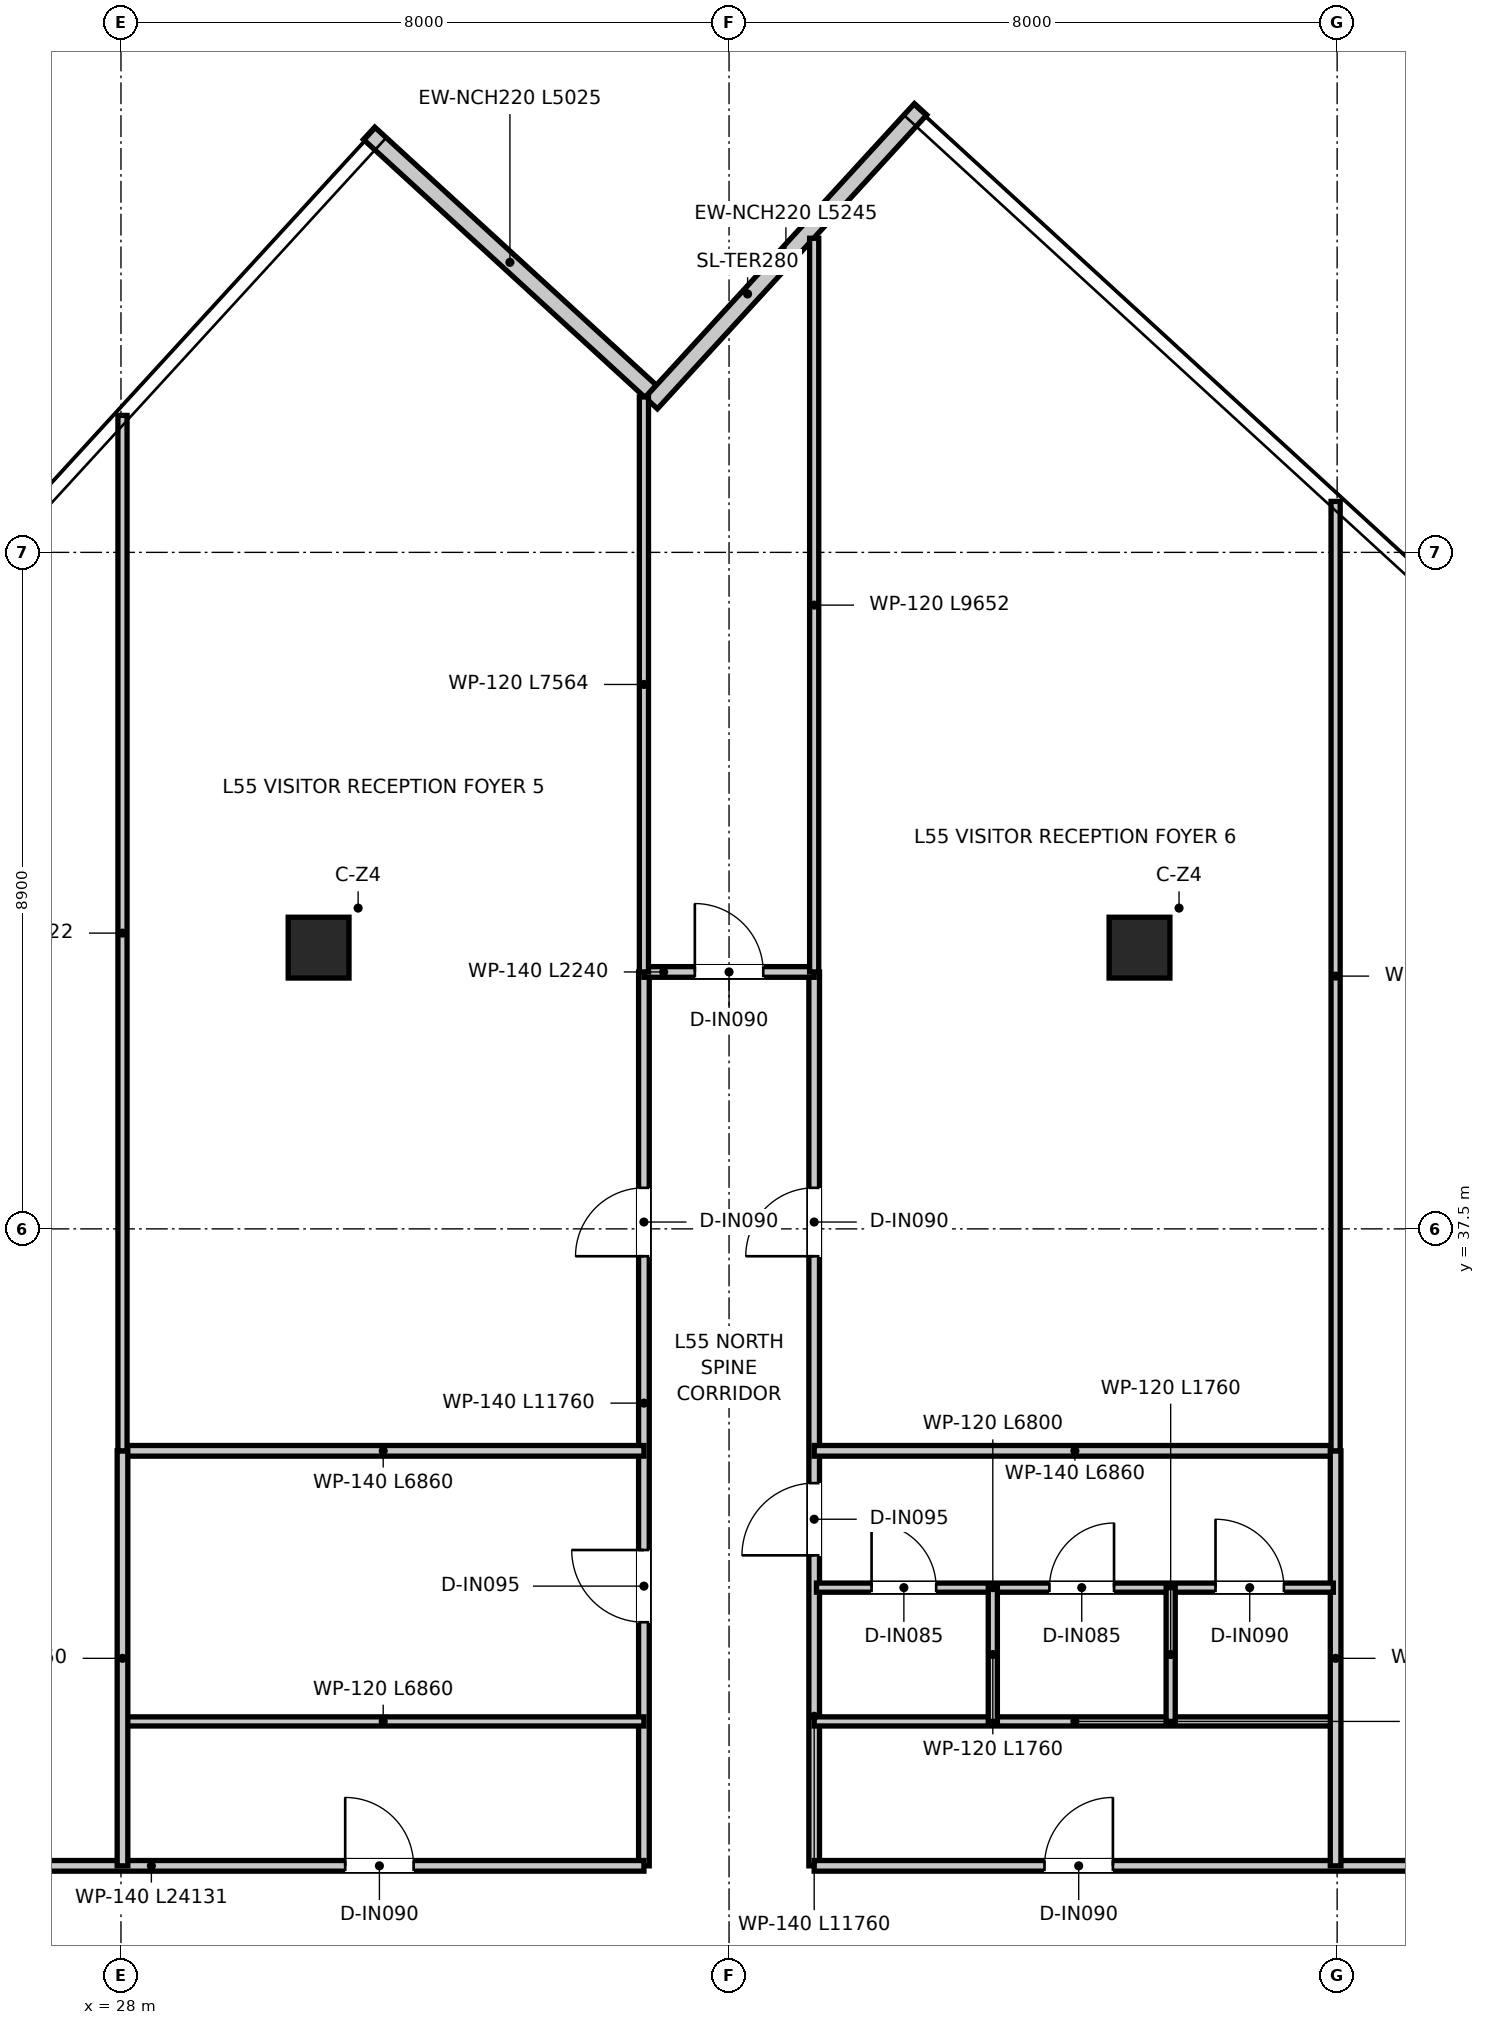
"""IFC4 building model, lengths in metres.
Left out: names, types, materials, properties, quantities, classifications, styles, units other than length and angle.
Written with IfcOpenShell. Run it as: python <this file> out.ifc"""

import sys

from ifc_helpers import new_model, si_unit, direction, frame, frame_2d, origin, origin_2d, place, context, subcontext, project, spatial, rectangle, extrude, source, transform, mapped, element, fill, save


model = new_model("IFC4")
c1 = context("Model", 3, precision=1e-05, world=origin(), true_north=direction((0.0, 1.0)))
c2 = subcontext(c1, "Body", "Model", "MODEL_VIEW")
j1 = project(units=[si_unit("LENGTHUNIT", "METRE"), si_unit("PLANEANGLEUNIT", "RADIAN")], contexts=[c1])
p1 = place(None, origin())
s1 = spatial("IfcSite", under=j1, at=p1, CompositionType="ELEMENT")
p2 = place(p1, origin())
s2 = spatial("IfcBuilding", under=s1, at=p2, CompositionType="ELEMENT")
p3 = place(p2, frame((0.0, 0.0, 227.05)))
s3 = spatial("IfcBuildingStorey", under=s2, at=p3, CompositionType="ELEMENT", Elevation=227.05)
m1 = source(origin(), c2, "Body", "SweptSolid", [
    extrude(rectangle(XDim=0.8, YDim=0.8, at=origin_2d()), origin(), (0.0, 0.0, 1.0), 3.95),
])
for number, where, z_axis, x_axis in (
    (1, (30.6, 41.2, 0.0), (0.0, 0.0, 1.0), (1.0, 0.0, 0.0)),
    (2, (41.4, 41.2, 0.0), (0.0, 0.0, 1.0), (1.0, 0.0, 0.0)),
):
    element("IfcColumn", number, at=place(p3, frame(where, z_axis=z_axis, x_axis=x_axis)), inside=s3, PredefinedType="COLUMN", context=c2, shape_type="MappedRepresentation", body=[
        mapped(m1, transform((0.0, 0.0, 0.0), x_axis=(1.0, 0.0, 0.0), y_axis=(0.0, 1.0, 0.0), z_axis=(0.0, 0.0, 1.0), scale=1.0)),
    ])
p4 = place(p3, frame((34.969, 48.518, 0.0), z_axis=(0.0, 0.0, 1.0), x_axis=(-0.737285215553, 0.675581609375, 0.0)))
e3 = element("IfcWall", 3, at=p4, inside=s3, PredefinedType="ELEMENTEDWALL", context=c2, shape_type="SweptSolid", body=[
    extrude(rectangle(XDim=5.025, YDim=0.22, at=frame_2d((2.512, 0.0))), origin(), (0.0, 0.0, 1.0), 3.67),
])
p5 = place(p3, frame((38.52, 52.23, 0.0), z_axis=(0.0, 0.0, 1.0), x_axis=(-0.675596040677, -0.737271991752, 0.0)))
e4 = element("IfcWall", 4, at=p5, inside=s3, PredefinedType="ELEMENTEDWALL", context=c2, shape_type="SweptSolid", body=[
    extrude(rectangle(XDim=5.245, YDim=0.22, at=frame_2d((2.623, 0.0))), origin(), (0.0, 0.0, 1.0), 3.67),
])
p6 = place(p3, frame((34.88, 29.12, 0.0), z_axis=(0.0, 0.0, 1.0), x_axis=(0.0, 1.0, 0.0)))
e5 = element("IfcWall", 5, at=p6, inside=s3, PredefinedType="PARTITIONING", context=c2, shape_type="SweptSolid", body=[
    extrude(rectangle(XDim=11.76, YDim=0.14, at=frame_2d((5.88, 0.0))), origin(), (0.0, 0.0, 1.0), 3.03),
])
p7 = place(p6, frame((3.205, 0.0, 0.0)))
e6 = element("IfcOpeningElement", 6, at=p7, cuts=e5, PredefinedType="OPENING", context=c2, shape_type="SweptSolid", body=[
    extrude(rectangle(XDim=0.95, YDim=2.1, at=frame_2d((0.475, 1.05))), frame((0.0, 0.08, 0.0), z_axis=(0.0, -1.0, 0.0), x_axis=(1.0, 0.0, 0.0)), (0.0, 0.0, 1.0), 0.16),
])
p8 = place(p6, frame((8.02, 0.0, 0.0)))
e7 = element("IfcOpeningElement", 7, at=p8, cuts=e5, PredefinedType="OPENING", context=c2, shape_type="SweptSolid", body=[
    extrude(rectangle(XDim=0.9, YDim=2.1, at=frame_2d((0.45, 1.05))), frame((0.0, 0.08, 0.0), z_axis=(0.0, -1.0, 0.0), x_axis=(1.0, 0.0, 0.0)), (0.0, 0.0, 1.0), 0.16),
])
p9 = place(p3, frame((37.12, 29.12, 0.0), z_axis=(0.0, 0.0, 1.0), x_axis=(0.0, 1.0, 0.0)))
e8 = element("IfcWall", 8, at=p9, inside=s3, PredefinedType="PARTITIONING", context=c2, shape_type="SweptSolid", body=[
    extrude(rectangle(XDim=11.76, YDim=0.14, at=frame_2d((5.88, 0.0))), origin(), (0.0, 0.0, 1.0), 3.03),
])
p10 = place(p9, frame((4.085, 0.0, 0.0)))
e9 = element("IfcOpeningElement", 9, at=p10, cuts=e8, PredefinedType="OPENING", context=c2, shape_type="SweptSolid", body=[
    extrude(rectangle(XDim=0.95, YDim=2.1, at=frame_2d((0.475, 1.05))), frame((0.0, 0.08, 0.0), z_axis=(0.0, -1.0, 0.0), x_axis=(1.0, 0.0, 0.0)), (0.0, 0.0, 1.0), 0.16),
])
p11 = place(p9, frame((8.02, 0.0, 0.0)))
e10 = element("IfcOpeningElement", 10, at=p11, cuts=e8, PredefinedType="OPENING", context=c2, shape_type="SweptSolid", body=[
    extrude(rectangle(XDim=0.9, YDim=2.1, at=frame_2d((0.45, 1.05))), frame((0.0, 0.08, 0.0), z_axis=(0.0, -1.0, 0.0), x_axis=(1.0, 0.0, 0.0)), (0.0, 0.0, 1.0), 0.16),
])
p12 = place(p3, frame((34.88, 40.88, 0.0), z_axis=(0.0, 0.0, 1.0), x_axis=(1.0, 0.0, 0.0)))
e11 = element("IfcWall", 11, at=p12, inside=s3, PredefinedType="PARTITIONING", context=c2, shape_type="SweptSolid", body=[
    extrude(rectangle(XDim=2.24, YDim=0.14, at=frame_2d((1.12, 0.0))), origin(), (0.0, 0.0, 1.0), 3.67),
])
p13 = place(p12, frame((0.67, 0.0, 0.0)))
e12 = element("IfcOpeningElement", 12, at=p13, cuts=e11, PredefinedType="OPENING", context=c2, shape_type="SweptSolid", body=[
    extrude(rectangle(XDim=0.9, YDim=2.1, at=frame_2d((0.45, 1.05))), frame((0.0, 0.08, 0.0), z_axis=(0.0, -1.0, 0.0), x_axis=(1.0, 0.0, 0.0)), (0.0, 0.0, 1.0), 0.16),
])
p14 = place(p3, frame((10.749, 29.12, 0.0), z_axis=(0.0, 0.0, 1.0), x_axis=(1.0, 0.0, 0.0)))
e13 = element("IfcWall", 13, at=p14, inside=s3, PredefinedType="PARTITIONING", context=c2, shape_type="SweptSolid", body=[
    extrude(rectangle(XDim=24.131, YDim=0.14, at=frame_2d((12.065, 0.0))), origin(), (0.0, 0.0, 1.0), 3.03),
])
p15 = place(p14, frame((20.201, 0.0, 0.0)))
e14 = element("IfcOpeningElement", 14, at=p15, cuts=e13, PredefinedType="OPENING", context=c2, shape_type="SweptSolid", body=[
    extrude(rectangle(XDim=0.9, YDim=2.1, at=frame_2d((0.45, 1.05))), frame((0.0, 0.08, 0.0), z_axis=(0.0, -1.0, 0.0), x_axis=(1.0, 0.0, 0.0)), (0.0, 0.0, 1.0), 0.16),
])
p16 = place(p14, frame((4.664, 0.0, 0.0)))
e15 = element("IfcOpeningElement", 15, at=p16, cuts=e13, PredefinedType="OPENING", context=c2, shape_type="SweptSolid", body=[
    extrude(rectangle(XDim=0.9, YDim=2.1, at=frame_2d((0.45, 1.05))), frame((0.0, 0.08, 0.0), z_axis=(0.0, -1.0, 0.0), x_axis=(1.0, 0.0, 0.0)), (0.0, 0.0, 1.0), 0.16),
])
p17 = place(p14, frame((10.501, 0.0, 0.0)))
e16 = element("IfcOpeningElement", 16, at=p17, cuts=e13, PredefinedType="OPENING", context=c2, shape_type="SweptSolid", body=[
    extrude(rectangle(XDim=0.9, YDim=2.1, at=frame_2d((0.45, 1.05))), frame((0.0, 0.08, 0.0), z_axis=(0.0, -1.0, 0.0), x_axis=(1.0, 0.0, 0.0)), (0.0, 0.0, 1.0), 0.16),
])
p18 = place(p14, frame((14.201, 0.0, 0.0)))
e17 = element("IfcOpeningElement", 17, at=p18, cuts=e13, PredefinedType="OPENING", context=c2, shape_type="SweptSolid", body=[
    extrude(rectangle(XDim=0.9, YDim=2.1, at=frame_2d((0.45, 1.05))), frame((0.0, 0.08, 0.0), z_axis=(0.0, -1.0, 0.0), x_axis=(1.0, 0.0, 0.0)), (0.0, 0.0, 1.0), 0.16),
])
p19 = place(p3, frame((37.12, 29.12, 0.0), z_axis=(0.0, 0.0, 1.0), x_axis=(1.0, 0.0, 0.0)))
e18 = element("IfcWall", 18, at=p19, inside=s3, PredefinedType="PARTITIONING", context=c2, shape_type="SweptSolid", body=[
    extrude(rectangle(XDim=21.815, YDim=0.14, at=frame_2d((10.908, 0.0))), origin(), (0.0, 0.0, 1.0), 3.03),
])
p20 = place(p19, frame((3.03, 0.0, 0.0)))
e19 = element("IfcOpeningElement", 19, at=p20, cuts=e18, PredefinedType="OPENING", context=c2, shape_type="SweptSolid", body=[
    extrude(rectangle(XDim=0.9, YDim=2.1, at=frame_2d((0.45, 1.05))), frame((0.0, 0.08, 0.0), z_axis=(0.0, -1.0, 0.0), x_axis=(1.0, 0.0, 0.0)), (0.0, 0.0, 1.0), 0.16),
])
p21 = place(p19, frame((8.52, 0.0, 0.0)))
e20 = element("IfcOpeningElement", 20, at=p21, cuts=e18, PredefinedType="OPENING", context=c2, shape_type="SweptSolid", body=[
    extrude(rectangle(XDim=0.9, YDim=2.1, at=frame_2d((0.45, 1.05))), frame((0.0, 0.08, 0.0), z_axis=(0.0, -1.0, 0.0), x_axis=(1.0, 0.0, 0.0)), (0.0, 0.0, 1.0), 0.16),
])
p22 = place(p19, frame((12.23, 0.0, 0.0)))
e21 = element("IfcOpeningElement", 21, at=p22, cuts=e18, PredefinedType="OPENING", context=c2, shape_type="SweptSolid", body=[
    extrude(rectangle(XDim=0.9, YDim=2.1, at=frame_2d((0.45, 1.05))), frame((0.0, 0.08, 0.0), z_axis=(0.0, -1.0, 0.0), x_axis=(1.0, 0.0, 0.0)), (0.0, 0.0, 1.0), 0.16),
])
p23 = place(p19, frame((18.367, 0.0, 0.0)))
e22 = element("IfcOpeningElement", 22, at=p23, cuts=e18, PredefinedType="OPENING", context=c2, shape_type="SweptSolid", body=[
    extrude(rectangle(XDim=0.9, YDim=2.1, at=frame_2d((0.45, 1.05))), frame((0.0, 0.08, 0.0), z_axis=(0.0, -1.0, 0.0), x_axis=(1.0, 0.0, 0.0)), (0.0, 0.0, 1.0), 0.16),
])
for number, where, z_axis, x_axis in (
    (23, (28.02, 31.02, 0.0), (0.0, 0.0, 1.0), (1.0, 0.0, 0.0)),
    (24, (37.12, 31.02, 0.0), (0.0, 0.0, 1.0), (1.0, 0.0, 0.0)),
):
    element("IfcWall", number, at=place(p3, frame(where, z_axis=z_axis, x_axis=x_axis)), inside=s3, PredefinedType="PARTITIONING", context=c2, shape_type="SweptSolid", body=[
        extrude(rectangle(XDim=6.86, YDim=0.12, at=frame_2d((3.43, 0.0))), origin(), (0.0, 0.0, 1.0), 3.18),
    ])
for number, where, z_axis, x_axis in (
    (25, (28.02, 34.58, 0.0), (0.0, 0.0, 1.0), (1.0, 0.0, 0.0)),
    (26, (37.12, 34.58, 0.0), (0.0, 0.0, 1.0), (1.0, 0.0, 0.0)),
):
    element("IfcWall", number, at=place(p3, frame(where, z_axis=z_axis, x_axis=x_axis)), inside=s3, PredefinedType="PARTITIONING", context=c2, shape_type="SweptSolid", body=[
        extrude(rectangle(XDim=6.86, YDim=0.14, at=frame_2d((3.43, 0.0))), origin(), (0.0, 0.0, 1.0), 3.18),
    ])
for number, where, z_axis, x_axis in (
    (27, (28.02, 29.12, 0.0), (0.0, 0.0, 1.0), (0.0, 1.0, 0.0)),
    (28, (43.98, 29.12, 0.0), (0.0, 0.0, 1.0), (0.0, 1.0, 0.0)),
):
    element("IfcWall", number, at=place(p3, frame(where, z_axis=z_axis, x_axis=x_axis)), inside=s3, PredefinedType="PARTITIONING", context=c2, shape_type="SweptSolid", body=[
        extrude(rectangle(XDim=5.46, YDim=0.14, at=frame_2d((2.73, 0.0))), origin(), (0.0, 0.0, 1.0), 3.37),
    ])
p24 = place(p3, frame((37.15, 32.78, 0.0), z_axis=(0.0, 0.0, 1.0), x_axis=(1.0, 0.0, 0.0)))
e29 = element("IfcWall", 29, at=p24, inside=s3, PredefinedType="PARTITIONING", context=c2, shape_type="SweptSolid", body=[
    extrude(rectangle(XDim=6.8, YDim=0.12, at=frame_2d((3.4, 0.0))), origin(), (0.0, 0.0, 1.0), 3.18),
])
p25 = place(p24, frame((0.725, 0.0, 0.0)))
e30 = element("IfcOpeningElement", 30, at=p25, cuts=e29, PredefinedType="OPENING", context=c2, shape_type="SweptSolid", body=[
    extrude(rectangle(XDim=0.85, YDim=2.1, at=frame_2d((0.425, 1.05))), frame((0.0, 0.07, 0.0), z_axis=(0.0, -1.0, 0.0), x_axis=(1.0, 0.0, 0.0)), (0.0, 0.0, 1.0), 0.14),
])
p26 = place(p24, frame((3.065, 0.0, 0.0)))
e31 = element("IfcOpeningElement", 31, at=p26, cuts=e29, PredefinedType="OPENING", context=c2, shape_type="SweptSolid", body=[
    extrude(rectangle(XDim=0.85, YDim=2.1, at=frame_2d((0.425, 1.05))), frame((0.0, 0.07, 0.0), z_axis=(0.0, -1.0, 0.0), x_axis=(1.0, 0.0, 0.0)), (0.0, 0.0, 1.0), 0.14),
])
p27 = place(p24, frame((5.25, 0.0, 0.0)))
e32 = element("IfcOpeningElement", 32, at=p27, cuts=e29, PredefinedType="OPENING", context=c2, shape_type="SweptSolid", body=[
    extrude(rectangle(XDim=0.9, YDim=2.1, at=frame_2d((0.45, 1.05))), frame((0.0, 0.07, 0.0), z_axis=(0.0, -1.0, 0.0), x_axis=(1.0, 0.0, 0.0)), (0.0, 0.0, 1.0), 0.14),
])
for number, where, z_axis, x_axis in (
    (33, (39.47, 31.02, 0.0), (0.0, 0.0, 1.0), (0.0, 1.0, 0.0)),
    (34, (41.81, 31.02, 0.0), (0.0, 0.0, 1.0), (0.0, 1.0, 0.0)),
):
    element("IfcWall", number, at=place(p3, frame(where, z_axis=z_axis, x_axis=x_axis)), inside=s3, PredefinedType="PARTITIONING", context=c2, shape_type="SweptSolid", body=[
        extrude(rectangle(XDim=1.76, YDim=0.12, at=frame_2d((0.88, 0.0))), origin(), (0.0, 0.0, 1.0), 3.67),
    ])
p28 = place(p3, frame((34.88, 40.88, 0.0), z_axis=(0.0, 0.0, 1.0), x_axis=(0.0, 1.0, 0.0)))
e35 = element("IfcWall", 35, at=p28, inside=s3, PredefinedType="PARTITIONING", context=c2, shape_type="SweptSolid", body=[
    extrude(rectangle(XDim=7.564, YDim=0.12, at=frame_2d((3.782, 0.0))), origin(), (0.0, 0.0, 1.0), 3.28),
])
p29 = place(p3, frame((37.12, 40.88, 0.0), z_axis=(0.0, 0.0, 1.0), x_axis=(0.0, 1.0, 0.0)))
e36 = element("IfcWall", 36, at=p29, inside=s3, PredefinedType="PARTITIONING", context=c2, shape_type="SweptSolid", body=[
    extrude(rectangle(XDim=9.652, YDim=0.12, at=frame_2d((4.826, 0.0))), origin(), (0.0, 0.0, 1.0), 3.28),
])
p30 = place(p3, frame((28.02, 34.58, 0.0), z_axis=(0.0, 0.0, 1.0), x_axis=(0.0, 1.0, 0.0)))
e37 = element("IfcWall", 37, at=p30, inside=s3, PredefinedType="PARTITIONING", context=c2, shape_type="SweptSolid", body=[
    extrude(rectangle(XDim=13.622, YDim=0.12, at=frame_2d((6.811, 0.0))), origin(), (0.0, 0.0, 1.0), 3.03),
])
p31 = place(p3, frame((43.98, 34.58, 0.0), z_axis=(0.0, 0.0, 1.0), x_axis=(0.0, 1.0, 0.0)))
e38 = element("IfcWall", 38, at=p31, inside=s3, PredefinedType="PARTITIONING", context=c2, shape_type="SweptSolid", body=[
    extrude(rectangle(XDim=12.49, YDim=0.12, at=frame_2d((6.245, 0.0))), origin(), (0.0, 0.0, 1.0), 3.03),
])
p32 = place(p15, origin())
e39 = element("IfcDoor", 39, at=p32, inside=s3, OperationType="SINGLE_SWING_LEFT", PredefinedType="DOOR", context=c2, shape_type="SweptSolid", body=[
    extrude(rectangle(XDim=0.9, YDim=2.1, at=frame_2d((0.45, 1.05))), frame((0.0, 0.025, 0.0), z_axis=(0.0, -1.0, 0.0), x_axis=(1.0, 0.0, 0.0)), (0.0, 0.0, 1.0), 0.05),
])
fill(e14, e39)
p33 = place(p20, origin())
e40 = element("IfcDoor", 40, at=p33, inside=s3, OperationType="SINGLE_SWING_RIGHT", PredefinedType="DOOR", context=c2, shape_type="SweptSolid", body=[
    extrude(rectangle(XDim=0.9, YDim=2.1, at=frame_2d((0.45, 1.05))), frame((0.0, 0.025, 0.0), z_axis=(0.0, -1.0, 0.0), x_axis=(1.0, 0.0, 0.0)), (0.0, 0.0, 1.0), 0.05),
])
fill(e19, e40)
p34 = place(p10, origin())
e41 = element("IfcDoor", 41, at=p34, inside=s3, OperationType="SINGLE_SWING_LEFT", PredefinedType="DOOR", context=c2, shape_type="SweptSolid", body=[
    extrude(rectangle(XDim=0.95, YDim=2.1, at=frame_2d((0.475, 1.05))), frame((0.0, 0.025, 0.0), z_axis=(0.0, -1.0, 0.0), x_axis=(1.0, 0.0, 0.0)), (0.0, 0.0, 1.0), 0.05),
])
fill(e9, e41)
p35 = place(p7, origin())
e42 = element("IfcDoor", 42, at=p35, inside=s3, OperationType="SINGLE_SWING_RIGHT", PredefinedType="DOOR", context=c2, shape_type="SweptSolid", body=[
    extrude(rectangle(XDim=0.95, YDim=2.1, at=frame_2d((0.475, 1.05))), frame((0.0, 0.025, 0.0), z_axis=(0.0, -1.0, 0.0), x_axis=(1.0, 0.0, 0.0)), (0.0, 0.0, 1.0), 0.05),
])
fill(e6, e42)
p36 = place(p25, origin())
e43 = element("IfcDoor", 43, at=p36, inside=s3, OperationType="SINGLE_SWING_LEFT", PredefinedType="DOOR", context=c2, shape_type="SweptSolid", body=[
    extrude(rectangle(XDim=0.85, YDim=2.1, at=frame_2d((0.425, 1.05))), frame((0.0, 0.025, 0.0), z_axis=(0.0, -1.0, 0.0), x_axis=(1.0, 0.0, 0.0)), (0.0, 0.0, 1.0), 0.05),
])
fill(e30, e43)
p37 = place(p26, origin())
e44 = element("IfcDoor", 44, at=p37, inside=s3, OperationType="SINGLE_SWING_RIGHT", PredefinedType="DOOR", context=c2, shape_type="SweptSolid", body=[
    extrude(rectangle(XDim=0.85, YDim=2.1, at=frame_2d((0.425, 1.05))), frame((0.0, 0.025, 0.0), z_axis=(0.0, -1.0, 0.0), x_axis=(1.0, 0.0, 0.0)), (0.0, 0.0, 1.0), 0.05),
])
fill(e31, e44)
p38 = place(p27, origin())
e45 = element("IfcDoor", 45, at=p38, inside=s3, OperationType="SINGLE_SWING_LEFT", PredefinedType="DOOR", context=c2, shape_type="SweptSolid", body=[
    extrude(rectangle(XDim=0.9, YDim=2.1, at=frame_2d((0.45, 1.05))), frame((0.0, 0.025, 0.0), z_axis=(0.0, -1.0, 0.0), x_axis=(1.0, 0.0, 0.0)), (0.0, 0.0, 1.0), 0.05),
])
fill(e32, e45)
p39 = place(p13, origin())
e46 = element("IfcDoor", 46, at=p39, inside=s3, OperationType="SINGLE_SWING_LEFT", PredefinedType="DOOR", context=c2, shape_type="SweptSolid", body=[
    extrude(rectangle(XDim=0.9, YDim=2.1, at=frame_2d((0.45, 1.05))), frame((0.0, 0.025, 0.0), z_axis=(0.0, -1.0, 0.0), x_axis=(1.0, 0.0, 0.0)), (0.0, 0.0, 1.0), 0.05),
])
fill(e12, e46)
p40 = place(p8, origin())
e47 = element("IfcDoor", 47, at=p40, inside=s3, OperationType="SINGLE_SWING_LEFT", PredefinedType="DOOR", context=c2, shape_type="SweptSolid", body=[
    extrude(rectangle(XDim=0.9, YDim=2.1, at=frame_2d((0.45, 1.05))), frame((0.0, 0.025, 0.0), z_axis=(0.0, -1.0, 0.0), x_axis=(1.0, 0.0, 0.0)), (0.0, 0.0, 1.0), 0.05),
])
fill(e7, e47)
p41 = place(p11, origin())
e48 = element("IfcDoor", 48, at=p41, inside=s3, OperationType="SINGLE_SWING_LEFT", PredefinedType="DOOR", context=c2, shape_type="SweptSolid", body=[
    extrude(rectangle(XDim=0.9, YDim=2.1, at=frame_2d((0.45, 1.05))), frame((0.0, 0.025, 0.0), z_axis=(0.0, -1.0, 0.0), x_axis=(1.0, 0.0, 0.0)), (0.0, 0.0, 1.0), 0.05),
])
fill(e10, e48)
save(model, sys.argv[1])
